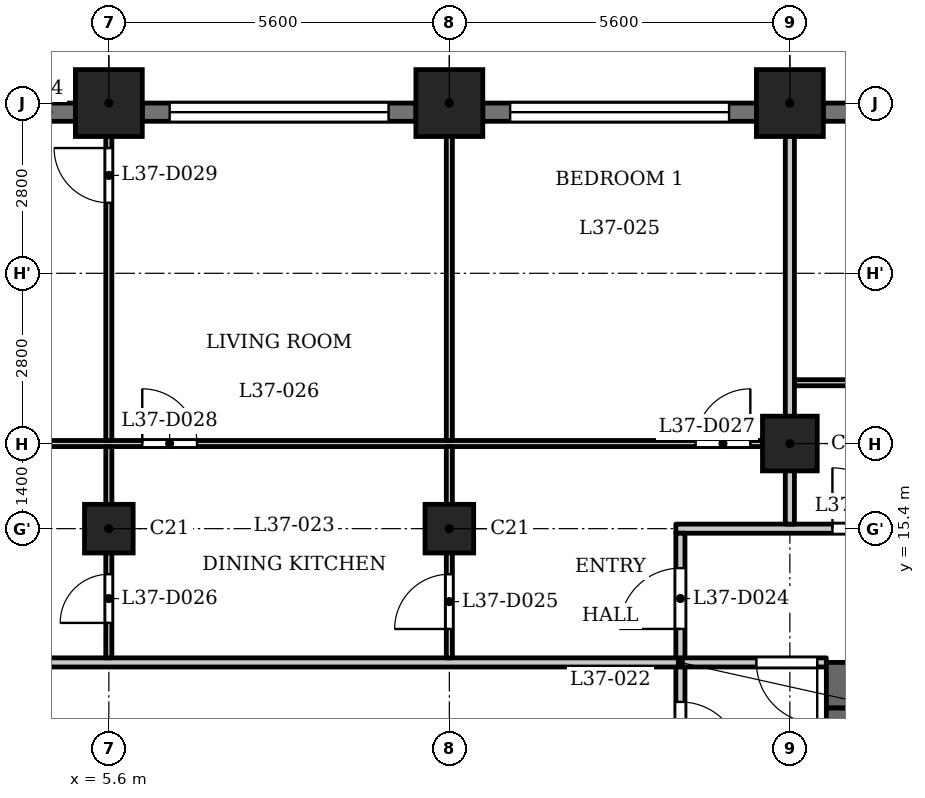
"""IFC4 building model, lengths in metres.
Left out: names, types, materials, properties, quantities, classifications, styles, units other than length and angle.
Written with IfcOpenShell. Run it as: python <this file> out.ifc"""

import sys

from ifc_helpers import new_model, si_unit, direction, frame, frame_2d, origin, origin_2d, place, context, subcontext, project, spatial, rectangle, extrude, element, fill, save


model = new_model("IFC4")
c1 = context("Model", 3, precision=1e-05, world=origin(), true_north=direction((0.0, 1.0)))
c2 = subcontext(c1, "Body", "Model", "MODEL_VIEW")
j1 = project(units=[si_unit("LENGTHUNIT", "METRE"), si_unit("PLANEANGLEUNIT", "RADIAN")], contexts=[c1])
p1 = place(None, origin())
s1 = spatial("IfcSite", under=j1, at=p1, CompositionType="ELEMENT")
p2 = place(p1, origin())
s2 = spatial("IfcBuilding", under=s1, at=p2, CompositionType="ELEMENT")
p3 = place(p2, frame((0.0, 0.0, 146.6)))
s3 = spatial("IfcBuildingStorey", under=s2, at=p3, CompositionType="ELEMENT", Elevation=146.6)
for number, where, z_axis, x_axis in (
    (1, (16.8, 22.4, 0.0), (0.0, 0.0, 1.0), (1.0, 0.0, 0.0)),
    (2, (11.2, 22.4, 0.0), (0.0, 0.0, 1.0), (1.0, 0.0, 0.0)),
    (3, (5.6, 22.4, 0.0), (0.0, 0.0, 1.0), (1.0, 0.0, 0.0)),
):
    element("IfcColumn", number, at=place(p3, frame(where, z_axis=z_axis, x_axis=x_axis)), inside=s3, PredefinedType="COLUMN", context=c2, shape_type="SweptSolid", body=[
        extrude(rectangle(XDim=1.1, YDim=1.1, at=origin_2d()), origin(), (0.0, 0.0, 1.0), 3.5),
    ])
p4 = place(p3, frame((16.8, 16.8, 0.0), z_axis=(0.0, 0.0, 1.0), x_axis=(1.0, 0.0, 0.0)))
e4 = element("IfcColumn", 4, at=p4, inside=s3, PredefinedType="COLUMN", context=c2, shape_type="SweptSolid", body=[
    extrude(rectangle(XDim=0.9, YDim=0.9, at=origin_2d()), origin(), (0.0, 0.0, 1.0), 3.5),
])
for number, where, z_axis, x_axis in (
    (5, (5.6, 15.4, 0.0), (0.0, 0.0, 1.0), (1.0, 0.0, 0.0)),
    (6, (11.2, 15.4, 0.0), (0.0, 0.0, 1.0), (1.0, 0.0, 0.0)),
):
    element("IfcColumn", number, at=place(p3, frame(where, z_axis=z_axis, x_axis=x_axis)), inside=s3, PredefinedType="COLUMN", context=c2, shape_type="SweptSolid", body=[
        extrude(rectangle(XDim=0.8, YDim=0.8, at=origin_2d()), origin(), (0.0, 0.0, 1.0), 3.5),
    ])
p5 = place(p3, frame((20.0, 22.25, 0.0), z_axis=(0.0, 0.0, 1.0), x_axis=(-1.0, 0.0, 0.0)))
e7 = element("IfcWall", 7, at=p5, inside=s3, PredefinedType="SOLIDWALL", context=c2, shape_type="SweptSolid", body=[
    extrude(rectangle(XDim=2.65, YDim=0.3, at=frame_2d((1.325, 0.0))), origin(), (0.0, 0.0, 1.0), 2.45),
])
p6 = place(p5, frame((0.725, 0.0, 0.6)))
e8 = element("IfcOpeningElement", 8, at=p6, cuts=e7, PredefinedType="OPENING", context=c2, shape_type="SweptSolid", body=[
    extrude(rectangle(XDim=1.2, YDim=1.55, at=frame_2d((0.6, 0.775))), frame((0.0, 0.16, 0.0), z_axis=(0.0, -1.0, 0.0), x_axis=(1.0, 0.0, 0.0)), (0.0, 0.0, 1.0), 0.32),
])
p7 = place(p3, frame((16.25, 22.25, 0.0), z_axis=(0.0, 0.0, 1.0), x_axis=(-1.0, 0.0, 0.0)))
e9 = element("IfcWall", 9, at=p7, inside=s3, PredefinedType="SOLIDWALL", context=c2, shape_type="SweptSolid", body=[
    extrude(rectangle(XDim=4.5, YDim=0.3, at=frame_2d((2.25, 0.0))), origin(), (0.0, 0.0, 1.0), 2.45),
])
p8 = place(p7, frame((0.45, 0.0, 1.2)))
e10 = element("IfcOpeningElement", 10, at=p8, cuts=e9, PredefinedType="OPENING", context=c2, shape_type="SweptSolid", body=[
    extrude(rectangle(XDim=3.6, YDim=0.95, at=frame_2d((1.8, 0.475))), frame((0.0, 0.16, 0.0), z_axis=(0.0, -1.0, 0.0), x_axis=(1.0, 0.0, 0.0)), (0.0, 0.0, 1.0), 0.32),
])
p9 = place(p3, frame((10.65, 22.25, 0.0), z_axis=(0.0, 0.0, 1.0), x_axis=(-1.0, 0.0, 0.0)))
e11 = element("IfcWall", 11, at=p9, inside=s3, PredefinedType="SOLIDWALL", context=c2, shape_type="SweptSolid", body=[
    extrude(rectangle(XDim=4.5, YDim=0.3, at=frame_2d((2.25, 0.0))), origin(), (0.0, 0.0, 1.0), 2.45),
])
p10 = place(p9, frame((0.45, 0.0, 1.2)))
e12 = element("IfcOpeningElement", 12, at=p10, cuts=e11, PredefinedType="OPENING", context=c2, shape_type="SweptSolid", body=[
    extrude(rectangle(XDim=3.6, YDim=0.95, at=frame_2d((1.8, 0.475))), frame((0.0, 0.16, 0.0), z_axis=(0.0, -1.0, 0.0), x_axis=(1.0, 0.0, 0.0)), (0.0, 0.0, 1.0), 0.32),
])
p11 = place(p3, frame((5.05, 22.25, 0.0), z_axis=(0.0, 0.0, 1.0), x_axis=(-1.0, 0.0, 0.0)))
e13 = element("IfcWall", 13, at=p11, inside=s3, PredefinedType="SOLIDWALL", context=c2, shape_type="SweptSolid", body=[
    extrude(rectangle(XDim=4.5, YDim=0.3, at=frame_2d((2.25, 0.0))), origin(), (0.0, 0.0, 1.0), 2.45),
])
p12 = place(p11, frame((0.45, 0.0, 1.2)))
e14 = element("IfcOpeningElement", 14, at=p12, cuts=e13, PredefinedType="OPENING", context=c2, shape_type="SweptSolid", body=[
    extrude(rectangle(XDim=3.6, YDim=0.95, at=frame_2d((1.8, 0.475))), frame((0.0, 0.16, 0.0), z_axis=(0.0, -1.0, 0.0), x_axis=(1.0, 0.0, 0.0)), (0.0, 0.0, 1.0), 0.32),
])
p13 = place(p3, frame((17.4, 12.825, 0.0), z_axis=(0.0, 0.0, 1.0), x_axis=(1.0, 0.0, 0.0)))
e15 = element("IfcWall", 15, at=p13, inside=s3, PredefinedType="SHEAR", context=c2, shape_type="SweptSolid", body=[
    extrude(rectangle(XDim=10.4, YDim=0.75, at=frame_2d((5.2, 0.0))), origin(), (0.0, 0.0, 1.0), 3.2),
])
p14 = place(p3, frame((17.6, -12.45, 0.0), z_axis=(0.0, 0.0, 1.0), x_axis=(0.0, 1.0, 0.0)))
e16 = element("IfcWall", 16, at=p14, inside=s3, PredefinedType="SHEAR", context=c2, shape_type="SweptSolid", body=[
    extrude(rectangle(XDim=24.9, YDim=0.4, at=frame_2d((12.45, 0.0))), origin(), (0.0, 0.0, 1.0), 3.2),
])
p15 = place(p14, frame((6.325, 0.0, 0.0)))
e17 = element("IfcOpeningElement", 17, at=p15, cuts=e16, PredefinedType="OPENING", context=c2, shape_type="SweptSolid", body=[
    extrude(rectangle(XDim=0.9, YDim=2.1, at=frame_2d((0.45, 1.05))), frame((0.0, 0.21, 0.0), z_axis=(0.0, -1.0, 0.0), x_axis=(1.0, 0.0, 0.0)), (0.0, 0.0, 1.0), 0.42),
])
p16 = place(p14, frame((9.925, 0.0, 0.0)))
e18 = element("IfcOpeningElement", 18, at=p16, cuts=e16, PredefinedType="OPENING", context=c2, shape_type="SweptSolid", body=[
    extrude(rectangle(XDim=0.9, YDim=2.1, at=frame_2d((0.45, 1.05))), frame((0.0, 0.21, 0.0), z_axis=(0.0, -1.0, 0.0), x_axis=(1.0, 0.0, 0.0)), (0.0, 0.0, 1.0), 0.42),
])
p17 = place(p14, frame((15.6, 0.0, 0.0)))
e19 = element("IfcOpeningElement", 19, at=p17, cuts=e16, PredefinedType="OPENING", context=c2, shape_type="SweptSolid", body=[
    extrude(rectangle(XDim=1.1, YDim=2.1, at=frame_2d((0.55, 1.05))), frame((0.0, 0.21, 0.0), z_axis=(0.0, -1.0, 0.0), x_axis=(1.0, 0.0, 0.0)), (0.0, 0.0, 1.0), 0.42),
])
p18 = place(p14, frame((18.0, 0.0, 0.0)))
e20 = element("IfcOpeningElement", 20, at=p18, cuts=e16, PredefinedType="OPENING", context=c2, shape_type="SweptSolid", body=[
    extrude(rectangle(XDim=1.1, YDim=2.1, at=frame_2d((0.55, 1.05))), frame((0.0, 0.21, 0.0), z_axis=(0.0, -1.0, 0.0), x_axis=(1.0, 0.0, 0.0)), (0.0, 0.0, 1.0), 0.42),
])
p19 = place(p14, frame((23.025, 0.0, 0.0)))
e21 = element("IfcOpeningElement", 21, at=p19, cuts=e16, PredefinedType="OPENING", context=c2, shape_type="SweptSolid", body=[
    extrude(rectangle(XDim=1.1, YDim=2.1, at=frame_2d((0.55, 1.05))), frame((0.0, 0.21, 0.0), z_axis=(0.0, -1.0, 0.0), x_axis=(1.0, 0.0, 0.0)), (0.0, 0.0, 1.0), 0.42),
])
p20 = place(p14, frame((0.775, 0.0, 0.0)))
e22 = element("IfcOpeningElement", 22, at=p20, cuts=e16, PredefinedType="OPENING", context=c2, shape_type="SweptSolid", body=[
    extrude(rectangle(XDim=1.1, YDim=2.1, at=frame_2d((0.55, 1.05))), frame((0.0, 0.21, 0.0), z_axis=(0.0, -1.0, 0.0), x_axis=(1.0, 0.0, 0.0)), (0.0, 0.0, 1.0), 0.42),
])
p21 = place(p14, frame((12.925, 0.0, 0.0)))
e23 = element("IfcOpeningElement", 23, at=p21, cuts=e16, PredefinedType="OPENING", context=c2, shape_type="SweptSolid", body=[
    extrude(rectangle(XDim=1.8, YDim=2.1, at=frame_2d((0.9, 1.05))), frame((0.0, 0.21, 0.0), z_axis=(0.0, -1.0, 0.0), x_axis=(1.0, 0.0, 0.0)), (0.0, 0.0, 1.0), 0.42),
])
p22 = place(p3, frame((-17.4, 13.2, 0.0), z_axis=(0.0, 0.0, 1.0), x_axis=(1.0, 0.0, 0.0)))
e24 = element("IfcWall", 24, at=p22, inside=s3, PredefinedType="PARTITIONING", context=c2, shape_type="SweptSolid", body=[
    extrude(rectangle(XDim=34.8, YDim=0.15, at=frame_2d((17.4, 0.0))), origin(), (0.0, 0.0, 1.0), 3.2),
])
p23 = place(p22, frame((0.25, 0.0, 0.0)))
e25 = element("IfcOpeningElement", 25, at=p23, cuts=e24, PredefinedType="OPENING", context=c2, shape_type="SweptSolid", body=[
    extrude(rectangle(XDim=1.0, YDim=2.1, at=frame_2d((0.5, 1.05))), frame((0.0, 0.085, 0.0), z_axis=(0.0, -1.0, 0.0), x_axis=(1.0, 0.0, 0.0)), (0.0, 0.0, 1.0), 0.17),
])
p24 = place(p22, frame((33.65, 0.0, 0.0)))
e26 = element("IfcOpeningElement", 26, at=p24, cuts=e24, PredefinedType="OPENING", context=c2, shape_type="SweptSolid", body=[
    extrude(rectangle(XDim=1.0, YDim=2.1, at=frame_2d((0.5, 1.05))), frame((0.0, 0.085, 0.0), z_axis=(0.0, -1.0, 0.0), x_axis=(1.0, 0.0, 0.0)), (0.0, 0.0, 1.0), 0.17),
])
p25 = place(p22, frame((13.75, 0.0, 0.0)))
e27 = element("IfcOpeningElement", 27, at=p25, cuts=e24, PredefinedType="OPENING", context=c2, shape_type="SweptSolid", body=[
    extrude(rectangle(XDim=1.0, YDim=2.1, at=frame_2d((0.5, 1.05))), frame((0.0, 0.085, 0.0), z_axis=(0.0, -1.0, 0.0), x_axis=(1.0, 0.0, 0.0)), (0.0, 0.0, 1.0), 0.17),
])
p26 = place(p3, frame((14.925, 15.4, 0.0), z_axis=(0.0, 0.0, 1.0), x_axis=(1.0, 0.0, 0.0)))
e28 = element("IfcWall", 28, at=p26, inside=s3, PredefinedType="PARTITIONING", context=c2, shape_type="SweptSolid", body=[
    extrude(rectangle(XDim=12.559, YDim=0.15, at=frame_2d((6.279, 0.0))), origin(), (0.0, 0.0, 1.0), 3.2),
])
p27 = place(p26, frame((2.575, 0.0, 0.0)))
e29 = element("IfcOpeningElement", 29, at=p27, cuts=e28, PredefinedType="OPENING", context=c2, shape_type="SweptSolid", body=[
    extrude(rectangle(XDim=1.0, YDim=2.1, at=frame_2d((0.5, 1.05))), frame((0.0, 0.085, 0.0), z_axis=(0.0, -1.0, 0.0), x_axis=(1.0, 0.0, 0.0)), (0.0, 0.0, 1.0), 0.17),
])
p28 = place(p3, frame((-16.725, 16.8, 0.0), z_axis=(0.0, 0.0, 1.0), x_axis=(1.0, 0.0, 0.0)))
e30 = element("IfcWall", 30, at=p28, inside=s3, PredefinedType="PARTITIONING", context=c2, shape_type="SweptSolid", body=[
    extrude(rectangle(XDim=33.45, YDim=0.1, at=frame_2d((16.725, 0.0))), origin(), (0.0, 0.0, 1.0), 3.2),
])
p29 = place(p28, frame((9.575, 0.0, 0.0)))
e31 = element("IfcOpeningElement", 31, at=p29, cuts=e30, PredefinedType="OPENING", context=c2, shape_type="SweptSolid", body=[
    extrude(rectangle(XDim=0.8, YDim=2.1, at=frame_2d((0.4, 1.05))), frame((0.0, 0.06, 0.0), z_axis=(0.0, -1.0, 0.0), x_axis=(1.0, 0.0, 0.0)), (0.0, 0.0, 1.0), 0.12),
])
p30 = place(p28, frame((6.125, 0.0, 0.0)))
e32 = element("IfcOpeningElement", 32, at=p30, cuts=e30, PredefinedType="OPENING", context=c2, shape_type="SweptSolid", body=[
    extrude(rectangle(XDim=0.9, YDim=2.1, at=frame_2d((0.45, 1.05))), frame((0.0, 0.06, 0.0), z_axis=(0.0, -1.0, 0.0), x_axis=(1.0, 0.0, 0.0)), (0.0, 0.0, 1.0), 0.12),
])
p31 = place(p28, frame((0.975, 0.0, 0.0)))
e33 = element("IfcOpeningElement", 33, at=p31, cuts=e30, PredefinedType="OPENING", context=c2, shape_type="SweptSolid", body=[
    extrude(rectangle(XDim=0.9, YDim=2.1, at=frame_2d((0.45, 1.05))), frame((0.0, 0.06, 0.0), z_axis=(0.0, -1.0, 0.0), x_axis=(1.0, 0.0, 0.0)), (0.0, 0.0, 1.0), 0.12),
])
p32 = place(p28, frame((3.225, 0.0, 0.0)))
e34 = element("IfcOpeningElement", 34, at=p32, cuts=e30, PredefinedType="OPENING", context=c2, shape_type="SweptSolid", body=[
    extrude(rectangle(XDim=0.9, YDim=2.1, at=frame_2d((0.45, 1.05))), frame((0.0, 0.06, 0.0), z_axis=(0.0, -1.0, 0.0), x_axis=(1.0, 0.0, 0.0)), (0.0, 0.0, 1.0), 0.12),
])
p33 = place(p28, frame((15.375, 0.0, 0.0)))
e35 = element("IfcOpeningElement", 35, at=p33, cuts=e30, PredefinedType="OPENING", context=c2, shape_type="SweptSolid", body=[
    extrude(rectangle(XDim=0.8, YDim=2.1, at=frame_2d((0.4, 1.05))), frame((0.0, 0.06, 0.0), z_axis=(0.0, -1.0, 0.0), x_axis=(1.0, 0.0, 0.0)), (0.0, 0.0, 1.0), 0.12),
])
p34 = place(p28, frame((13.175, 0.0, 0.0)))
e36 = element("IfcOpeningElement", 36, at=p34, cuts=e30, PredefinedType="OPENING", context=c2, shape_type="SweptSolid", body=[
    extrude(rectangle(XDim=0.9, YDim=2.1, at=frame_2d((0.45, 1.05))), frame((0.0, 0.06, 0.0), z_axis=(0.0, -1.0, 0.0), x_axis=(1.0, 0.0, 0.0)), (0.0, 0.0, 1.0), 0.12),
])
p35 = place(p28, frame((31.975, 0.0, 0.0)))
e37 = element("IfcOpeningElement", 37, at=p35, cuts=e30, PredefinedType="OPENING", context=c2, shape_type="SweptSolid", body=[
    extrude(rectangle(XDim=0.9, YDim=2.1, at=frame_2d((0.45, 1.05))), frame((0.0, 0.06, 0.0), z_axis=(0.0, -1.0, 0.0), x_axis=(1.0, 0.0, 0.0)), (0.0, 0.0, 1.0), 0.12),
])
p36 = place(p28, frame((22.875, 0.0, 0.0)))
e38 = element("IfcOpeningElement", 38, at=p36, cuts=e30, PredefinedType="OPENING", context=c2, shape_type="SweptSolid", body=[
    extrude(rectangle(XDim=0.9, YDim=2.1, at=frame_2d((0.45, 1.05))), frame((0.0, 0.06, 0.0), z_axis=(0.0, -1.0, 0.0), x_axis=(1.0, 0.0, 0.0)), (0.0, 0.0, 1.0), 0.12),
])
p37 = place(p3, frame((16.875, 17.8, 0.0), z_axis=(0.0, 0.0, 1.0), x_axis=(1.0, 0.0, 0.0)))
e39 = element("IfcWall", 39, at=p37, inside=s3, PredefinedType="PARTITIONING", context=c2, shape_type="SweptSolid", body=[
    extrude(rectangle(XDim=9.519, YDim=0.1, at=frame_2d((4.76, 0.0))), origin(), (0.0, 0.0, 1.0), 3.2),
])
p38 = place(p37, frame((6.175, 0.0, 0.0)))
e40 = element("IfcOpeningElement", 40, at=p38, cuts=e39, PredefinedType="OPENING", context=c2, shape_type="SweptSolid", body=[
    extrude(rectangle(XDim=0.8, YDim=2.1, at=frame_2d((0.4, 1.05))), frame((0.0, 0.06, 0.0), z_axis=(0.0, -1.0, 0.0), x_axis=(1.0, 0.0, 0.0)), (0.0, 0.0, 1.0), 0.12),
])
p39 = place(p37, frame((1.725, 0.0, 0.0)))
e41 = element("IfcOpeningElement", 41, at=p39, cuts=e39, PredefinedType="OPENING", context=c2, shape_type="SweptSolid", body=[
    extrude(rectangle(XDim=0.9, YDim=2.1, at=frame_2d((0.45, 1.05))), frame((0.0, 0.06, 0.0), z_axis=(0.0, -1.0, 0.0), x_axis=(1.0, 0.0, 0.0)), (0.0, 0.0, 1.0), 0.12),
])
p40 = place(p3, frame((5.6, 13.275, 0.0), z_axis=(0.0, 0.0, 1.0), x_axis=(0.0, 1.0, 0.0)))
e42 = element("IfcWall", 42, at=p40, inside=s3, PredefinedType="PARTITIONING", context=c2, shape_type="SweptSolid", body=[
    extrude(rectangle(XDim=3.475, YDim=0.1, at=frame_2d((1.738, 0.0))), origin(), (0.0, 0.0, 1.0), 3.2),
])
p41 = place(p40, frame((0.575, 0.0, 0.0)))
e43 = element("IfcOpeningElement", 43, at=p41, cuts=e42, PredefinedType="OPENING", context=c2, shape_type="SweptSolid", body=[
    extrude(rectangle(XDim=0.8, YDim=2.1, at=frame_2d((0.4, 1.05))), frame((0.0, 0.06, 0.0), z_axis=(0.0, -1.0, 0.0), x_axis=(1.0, 0.0, 0.0)), (0.0, 0.0, 1.0), 0.12),
])
p42 = place(p3, frame((5.6, 16.85, 0.0), z_axis=(0.0, 0.0, 1.0), x_axis=(0.0, 1.0, 0.0)))
e44 = element("IfcWall", 44, at=p42, inside=s3, PredefinedType="PARTITIONING", context=c2, shape_type="SweptSolid", body=[
    extrude(rectangle(XDim=6.08, YDim=0.1, at=frame_2d((3.04, 0.0))), origin(), (0.0, 0.0, 1.0), 3.2),
])
p43 = place(p42, frame((3.91, 0.0, 0.0)))
e45 = element("IfcOpeningElement", 45, at=p43, cuts=e44, PredefinedType="OPENING", context=c2, shape_type="SweptSolid", body=[
    extrude(rectangle(XDim=0.9, YDim=2.1, at=frame_2d((0.45, 1.05))), frame((0.0, 0.06, 0.0), z_axis=(0.0, -1.0, 0.0), x_axis=(1.0, 0.0, 0.0)), (0.0, 0.0, 1.0), 0.12),
])
p44 = place(p3, frame((11.2, 13.275, 0.0), z_axis=(0.0, 0.0, 1.0), x_axis=(0.0, 1.0, 0.0)))
e46 = element("IfcWall", 46, at=p44, inside=s3, PredefinedType="PARTITIONING", context=c2, shape_type="SweptSolid", body=[
    extrude(rectangle(XDim=3.475, YDim=0.1, at=frame_2d((1.738, 0.0))), origin(), (0.0, 0.0, 1.0), 3.2),
])
p45 = place(p44, frame((0.475, 0.0, 0.0)))
e47 = element("IfcOpeningElement", 47, at=p45, cuts=e46, PredefinedType="OPENING", context=c2, shape_type="SweptSolid", body=[
    extrude(rectangle(XDim=0.9, YDim=2.1, at=frame_2d((0.45, 1.05))), frame((0.0, 0.06, 0.0), z_axis=(0.0, -1.0, 0.0), x_axis=(1.0, 0.0, 0.0)), (0.0, 0.0, 1.0), 0.12),
])
p46 = place(p3, frame((11.2, 16.85, 0.0), z_axis=(0.0, 0.0, 1.0), x_axis=(0.0, 1.0, 0.0)))
e48 = element("IfcWall", 48, at=p46, inside=s3, PredefinedType="PARTITIONING", context=c2, shape_type="SweptSolid", body=[
    extrude(rectangle(XDim=6.08, YDim=0.1, at=frame_2d((3.04, 0.0))), origin(), (0.0, 0.0, 1.0), 3.2),
])
p47 = place(p3, frame((15.0, 6.769, 0.0), z_axis=(0.0, 0.0, 1.0), x_axis=(0.0, 1.0, 0.0)))
e49 = element("IfcWall", 49, at=p47, inside=s3, PredefinedType="PARTITIONING", context=c2, shape_type="SweptSolid", body=[
    extrude(rectangle(XDim=6.356, YDim=0.15, at=frame_2d((3.178, 0.0))), origin(), (0.0, 0.0, 1.0), 3.2),
])
p48 = place(p47, frame((4.781, 0.0, 0.0)))
e50 = element("IfcOpeningElement", 50, at=p48, cuts=e49, PredefinedType="OPENING", context=c2, shape_type="SweptSolid", body=[
    extrude(rectangle(XDim=1.0, YDim=2.1, at=frame_2d((0.5, 1.05))), frame((0.0, 0.085, 0.0), z_axis=(0.0, -1.0, 0.0), x_axis=(1.0, 0.0, 0.0)), (0.0, 0.0, 1.0), 0.17),
])
p49 = place(p3, frame((15.0, 13.275, 0.0), z_axis=(0.0, 0.0, 1.0), x_axis=(0.0, 1.0, 0.0)))
e51 = element("IfcWall", 51, at=p49, inside=s3, PredefinedType="PARTITIONING", context=c2, shape_type="SweptSolid", body=[
    extrude(rectangle(XDim=2.05, YDim=0.15, at=frame_2d((1.025, 0.0))), origin(), (0.0, 0.0, 1.0), 3.2),
])
p50 = place(p49, frame((0.476, 0.0, 0.0)))
e52 = element("IfcOpeningElement", 52, at=p50, cuts=e51, PredefinedType="OPENING", context=c2, shape_type="SweptSolid", body=[
    extrude(rectangle(XDim=1.0, YDim=2.1, at=frame_2d((0.5, 1.05))), frame((0.0, 0.085, 0.0), z_axis=(0.0, -1.0, 0.0), x_axis=(1.0, 0.0, 0.0)), (0.0, 0.0, 1.0), 0.17),
])
p51 = place(p3, frame((16.8, 15.475, 0.0), z_axis=(0.0, 0.0, 1.0), x_axis=(0.0, 1.0, 0.0)))
e53 = element("IfcWall", 53, at=p51, inside=s3, PredefinedType="PARTITIONING", context=c2, shape_type="SweptSolid", body=[
    extrude(rectangle(XDim=7.455, YDim=0.15, at=frame_2d((3.728, 0.0))), origin(), (0.0, 0.0, 1.0), 3.2),
])
p52 = place(p48, origin())
e54 = element("IfcDoor", 54, at=p52, inside=s3, OperationType="SINGLE_SWING_LEFT", PredefinedType="DOOR", context=c2, shape_type="SweptSolid", body=[
    extrude(rectangle(XDim=1.0, YDim=2.1, at=frame_2d((0.5, 1.05))), frame((0.0, 0.025, 0.0), z_axis=(0.0, -1.0, 0.0), x_axis=(1.0, 0.0, 0.0)), (0.0, 0.0, 1.0), 0.05),
])
fill(e50, e54)
p53 = place(p24, origin())
e55 = element("IfcDoor", 55, at=p53, inside=s3, OperationType="SINGLE_SWING_RIGHT", PredefinedType="DOOR", context=c2, shape_type="SweptSolid", body=[
    extrude(rectangle(XDim=1.0, YDim=2.1, at=frame_2d((0.5, 1.05))), frame((0.0, 0.025, 0.0), z_axis=(0.0, -1.0, 0.0), x_axis=(1.0, 0.0, 0.0)), (0.0, 0.0, 1.0), 0.05),
])
fill(e26, e55)
p54 = place(p50, origin())
e56 = element("IfcDoor", 56, at=p54, inside=s3, OperationType="SINGLE_SWING_RIGHT", PredefinedType="DOOR", context=c2, shape_type="SweptSolid", body=[
    extrude(rectangle(XDim=1.0, YDim=2.1, at=frame_2d((0.5, 1.05))), frame((0.0, 0.025, 0.0), z_axis=(0.0, -1.0, 0.0), x_axis=(1.0, 0.0, 0.0)), (0.0, 0.0, 1.0), 0.05),
])
fill(e52, e56)
p55 = place(p45, origin())
e57 = element("IfcDoor", 57, at=p55, inside=s3, OperationType="SINGLE_SWING_RIGHT", PredefinedType="DOOR", context=c2, shape_type="SweptSolid", body=[
    extrude(rectangle(XDim=0.9, YDim=2.1, at=frame_2d((0.45, 1.05))), frame((0.0, 0.025, 0.0), z_axis=(0.0, -1.0, 0.0), x_axis=(1.0, 0.0, 0.0)), (0.0, 0.0, 1.0), 0.05),
])
fill(e47, e57)
p56 = place(p41, origin())
e58 = element("IfcDoor", 58, at=p56, inside=s3, OperationType="SINGLE_SWING_RIGHT", PredefinedType="DOOR", context=c2, shape_type="SweptSolid", body=[
    extrude(rectangle(XDim=0.8, YDim=2.1, at=frame_2d((0.4, 1.05))), frame((0.0, 0.025, 0.0), z_axis=(0.0, -1.0, 0.0), x_axis=(1.0, 0.0, 0.0)), (0.0, 0.0, 1.0), 0.05),
])
fill(e43, e58)
p57 = place(p35, origin())
e59 = element("IfcDoor", 59, at=p57, inside=s3, OperationType="SINGLE_SWING_LEFT", PredefinedType="DOOR", context=c2, shape_type="SweptSolid", body=[
    extrude(rectangle(XDim=0.9, YDim=2.1, at=frame_2d((0.45, 1.05))), frame((0.0, 0.025, 0.0), z_axis=(0.0, -1.0, 0.0), x_axis=(1.0, 0.0, 0.0)), (0.0, 0.0, 1.0), 0.05),
])
fill(e37, e59)
p58 = place(p36, origin())
e60 = element("IfcDoor", 60, at=p58, inside=s3, OperationType="SINGLE_SWING_RIGHT", PredefinedType="DOOR", context=c2, shape_type="SweptSolid", body=[
    extrude(rectangle(XDim=0.9, YDim=2.1, at=frame_2d((0.45, 1.05))), frame((0.0, 0.025, 0.0), z_axis=(0.0, -1.0, 0.0), x_axis=(1.0, 0.0, 0.0)), (0.0, 0.0, 1.0), 0.05),
])
fill(e38, e60)
p59 = place(p43, origin())
e61 = element("IfcDoor", 61, at=p59, inside=s3, OperationType="SINGLE_SWING_LEFT", PredefinedType="DOOR", context=c2, shape_type="SweptSolid", body=[
    extrude(rectangle(XDim=0.9, YDim=2.1, at=frame_2d((0.45, 1.05))), frame((0.0, 0.025, 0.0), z_axis=(0.0, -1.0, 0.0), x_axis=(1.0, 0.0, 0.0)), (0.0, 0.0, 1.0), 0.05),
])
fill(e45, e61)
p60 = place(p27, origin())
e62 = element("IfcDoor", 62, at=p60, inside=s3, OperationType="SINGLE_SWING_RIGHT", PredefinedType="DOOR", context=c2, shape_type="SweptSolid", body=[
    extrude(rectangle(XDim=1.0, YDim=2.1, at=frame_2d((0.5, 1.05))), frame((0.0, 0.025, 0.0), z_axis=(0.0, -1.0, 0.0), x_axis=(1.0, 0.0, 0.0)), (0.0, 0.0, 1.0), 0.05),
])
fill(e29, e62)
p61 = place(p8, origin())
e63 = element("IfcWindow", 63, at=p61, inside=s3, PartitioningType="SINGLE_PANEL", PredefinedType="WINDOW", context=c2, shape_type="SweptSolid", body=[
    extrude(rectangle(XDim=3.6, YDim=0.95, at=frame_2d((1.8, 0.475))), frame((0.0, 0.03, 0.0), z_axis=(0.0, -1.0, 0.0), x_axis=(1.0, 0.0, 0.0)), (0.0, 0.0, 1.0), 0.06),
])
fill(e10, e63)
p62 = place(p10, origin())
e64 = element("IfcWindow", 64, at=p62, inside=s3, PartitioningType="SINGLE_PANEL", PredefinedType="WINDOW", context=c2, shape_type="SweptSolid", body=[
    extrude(rectangle(XDim=3.6, YDim=0.95, at=frame_2d((1.8, 0.475))), frame((0.0, 0.03, 0.0), z_axis=(0.0, -1.0, 0.0), x_axis=(1.0, 0.0, 0.0)), (0.0, 0.0, 1.0), 0.06),
])
fill(e12, e64)
save(model, sys.argv[1])
